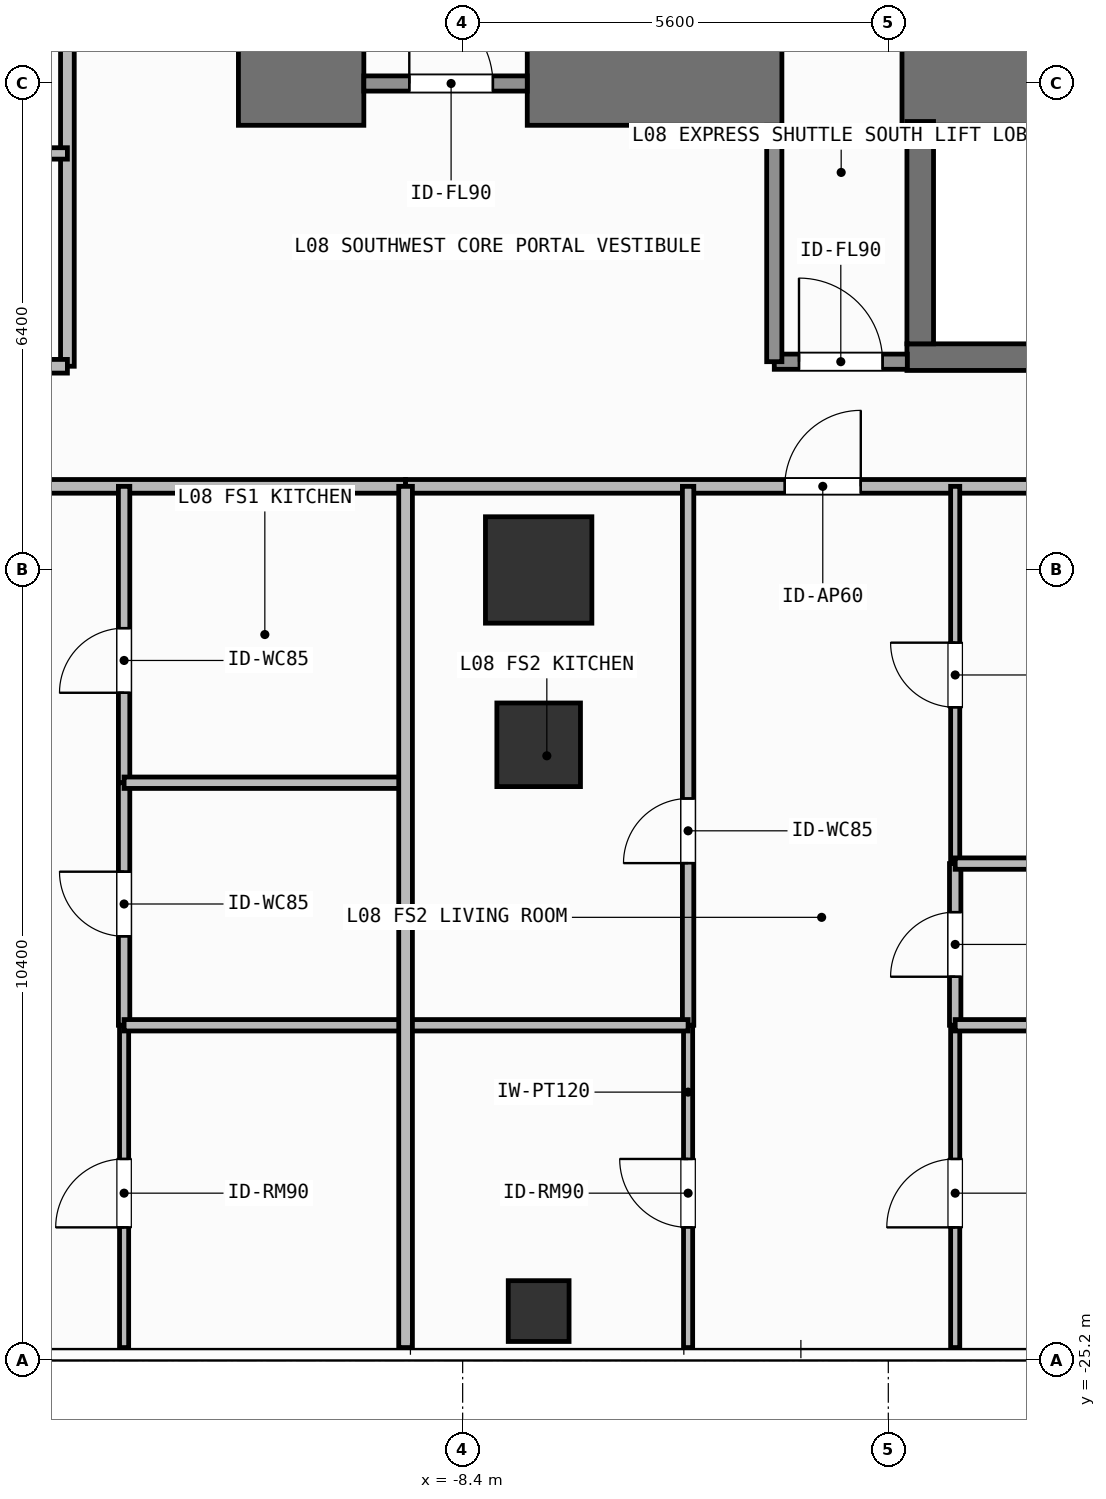
"""IFC4 building model, lengths in metres.
Left out: names, types, materials, properties, quantities, classifications, styles, units other than length and angle.
Written with IfcOpenShell. Run it as: python <this file> out.ifc"""

import sys

from ifc_helpers import new_model, si_unit, direction, frame, frame_2d, origin, origin_2d, place, context, subcontext, project, spatial, rectangle, hollow_rectangle, extrude, element, fill, save


model = new_model("IFC4")
c1 = context("Model", 3, precision=1e-05, world=origin(), true_north=direction((0.0, 1.0)))
c2 = subcontext(c1, "Body", "Model", "MODEL_VIEW")
j1 = project(units=[si_unit("LENGTHUNIT", "METRE"), si_unit("PLANEANGLEUNIT", "RADIAN")], contexts=[c1])
p1 = place(None, origin())
s1 = spatial("IfcSite", under=j1, at=p1, CompositionType="ELEMENT")
p2 = place(p1, origin())
s2 = spatial("IfcBuilding", under=s1, at=p2, CompositionType="ELEMENT")
p3 = place(p2, frame((0.0, 0.0, 30.6)))
s3 = spatial("IfcBuildingStorey", under=s2, at=p3, CompositionType="ELEMENT", Elevation=30.6)
p4 = place(p3, frame((-11.35, -8.4, 0.0), z_axis=(0.0, 0.0, 1.0), x_axis=(1.0, 0.0, 0.0)))
e1 = element("IfcWall", 1, at=p4, inside=s3, PredefinedType="SHEAR", context=c2, shape_type="SweptSolid", body=[
    extrude(rectangle(XDim=1.65, YDim=1.1, at=frame_2d((0.825, 0.0))), origin(), (0.0, 0.0, 1.0), 3.9),
])
p5 = place(p3, frame((-7.55, -8.4, 0.0), z_axis=(0.0, 0.0, 1.0), x_axis=(1.0, 0.0, 0.0)))
e2 = element("IfcWall", 2, at=p5, inside=s3, PredefinedType="SHEAR", context=c2, shape_type="SweptSolid", body=[
    extrude(rectangle(XDim=3.35, YDim=1.1, at=frame_2d((1.675, 0.0))), origin(), (0.0, 0.0, 1.0), 3.9),
])
p6 = place(p3, frame((-2.62, -8.4, 0.0), z_axis=(0.0, 0.0, 1.0), x_axis=(1.0, 0.0, 0.0)))
e3 = element("IfcWall", 3, at=p6, inside=s3, PredefinedType="SHEAR", context=c2, shape_type="SweptSolid", body=[
    extrude(rectangle(XDim=7.27, YDim=1.1, at=frame_2d((3.635, 0.0))), origin(), (0.0, 0.0, 1.0), 3.9),
])
p7 = place(p3, frame((-2.555, -12.0, 0.0), z_axis=(0.0, 0.0, 1.0), x_axis=(1.0, 0.0, 0.0)))
e4 = element("IfcWall", 4, at=p7, inside=s3, PredefinedType="SHEAR", context=c2, shape_type="SweptSolid", body=[
    extrude(rectangle(XDim=7.31, YDim=0.35, at=frame_2d((3.655, 0.0))), origin(), (0.0, 0.0, 1.0), 3.9),
])
p8 = place(p3, frame((-2.2, -8.988, 0.0), z_axis=(0.0, 0.0, 1.0), x_axis=(1.0, 0.0, 0.0)))
e5 = element("IfcWall", 5, at=p8, inside=s3, PredefinedType="SHEAR", context=c2, shape_type="SweptSolid", body=[
    extrude(rectangle(XDim=6.6, YDim=0.075, at=frame_2d((3.3, 0.0))), origin(), (0.0, 0.0, 1.0), 3.9),
])
p9 = place(p3, frame((-2.38, -11.825, 0.0), z_axis=(0.0, 0.0, 1.0), x_axis=(0.0, 1.0, 0.0)))
e6 = element("IfcWall", 6, at=p9, inside=s3, PredefinedType="SHEAR", context=c2, shape_type="SweptSolid", body=[
    extrude(rectangle(XDim=2.925, YDim=0.35, at=frame_2d((1.462, 0.0))), origin(), (0.0, 0.0, 1.0), 3.9),
])
p10 = place(p3, frame((-7.4, -14.8, 0.0), z_axis=(0.0, 0.0, 1.0), x_axis=(1.0, 0.0, 0.0)))
e7 = element("IfcColumn", 7, at=p10, inside=s3, PredefinedType="COLUMN", context=c2, shape_type="SweptSolid", body=[
    extrude(rectangle(XDim=1.4, YDim=1.4, at=origin_2d()), origin(), (0.0, 0.0, 1.0), 3.9),
])
p11 = place(p3, frame((-7.4, -17.1, 0.0), z_axis=(0.0, 0.0, 1.0), x_axis=(1.0, 0.0, 0.0)))
e8 = element("IfcColumn", 8, at=p11, inside=s3, PredefinedType="COLUMN", context=c2, shape_type="SweptSolid", body=[
    extrude(rectangle(XDim=1.1, YDim=1.1, at=origin_2d()), origin(), (0.0, 0.0, 1.0), 3.9),
])
p12 = place(p3, frame((-7.4, -24.55, 0.0), z_axis=(0.0, 0.0, 1.0), x_axis=(1.0, 0.0, 0.0)))
e9 = element("IfcColumn", 9, at=p12, inside=s3, PredefinedType="COLUMN", context=c2, shape_type="SweptSolid", body=[
    extrude(hollow_rectangle(XDim=0.8, YDim=0.8, WallThickness=0.036, at=origin_2d()), origin(), (0.0, 0.0, 1.0), 3.9),
])
p13 = place(p3, frame((-9.7, -8.4, 0.0), z_axis=(0.0, 0.0, 1.0), x_axis=(1.0, 0.0, 0.0)))
e10 = element("IfcWall", 10, at=p13, inside=s3, PredefinedType="SOLIDWALL", context=c2, shape_type="SweptSolid", body=[
    extrude(rectangle(XDim=2.15, YDim=0.2, at=frame_2d((1.075, 0.0))), origin(), (0.0, 0.0, 1.0), 2.72),
])
p14 = place(p13, frame((0.598, 0.0, 0.0)))
e11 = element("IfcOpeningElement", 11, at=p14, cuts=e10, PredefinedType="OPENING", context=c2, shape_type="SweptSolid", body=[
    extrude(rectangle(XDim=1.1, YDim=2.15, at=frame_2d((0.55, 1.075))), frame((0.0, 0.11, 0.0), z_axis=(0.0, -1.0, 0.0), x_axis=(1.0, 0.0, 0.0)), (0.0, 0.0, 1.0), 0.22),
])
p15 = place(p3, frame((-4.3, -12.06, 0.0), z_axis=(0.0, 0.0, 1.0), x_axis=(1.0, 0.0, 0.0)))
e12 = element("IfcWall", 12, at=p15, inside=s3, PredefinedType="SOLIDWALL", context=c2, shape_type="SweptSolid", body=[
    extrude(rectangle(XDim=1.75, YDim=0.2, at=frame_2d((0.875, 0.0))), origin(), (0.0, 0.0, 1.0), 3.68),
])
p16 = place(p15, frame((0.325, 0.0, 0.0)))
e13 = element("IfcOpeningElement", 13, at=p16, cuts=e12, PredefinedType="OPENING", context=c2, shape_type="SweptSolid", body=[
    extrude(rectangle(XDim=1.1, YDim=2.15, at=frame_2d((0.55, 1.075))), frame((0.0, 0.11, 0.0), z_axis=(0.0, -1.0, 0.0), x_axis=(1.0, 0.0, 0.0)), (0.0, 0.0, 1.0), 0.22),
])
p17 = place(p3, frame((-18.62, -13.7, 0.0), z_axis=(0.0, 0.0, 1.0), x_axis=(1.0, 0.0, 0.0)))
e14 = element("IfcWall", 14, at=p17, inside=s3, PredefinedType="PARTITIONING", context=c2, shape_type="SweptSolid", body=[
    extrude(rectangle(XDim=9.469, YDim=0.18, at=frame_2d((4.735, 0.0))), origin(), (0.0, 0.0, 1.0), 3.68),
])
p18 = place(p17, frame((1.931, 0.0, 0.0)))
e15 = element("IfcOpeningElement", 15, at=p18, cuts=e14, PredefinedType="OPENING", context=c2, shape_type="SweptSolid", body=[
    extrude(rectangle(XDim=1.0, YDim=2.2, at=frame_2d((0.5, 1.1))), frame((0.0, 0.1, 0.0), z_axis=(0.0, -1.0, 0.0), x_axis=(1.0, 0.0, 0.0)), (0.0, 0.0, 1.0), 0.2),
])
p19 = place(p3, frame((-12.854, -17.599, 0.0), z_axis=(0.0, 0.0, 1.0), x_axis=(0.0, 1.0, 0.0)))
e16 = element("IfcWall", 16, at=p19, inside=s3, PredefinedType="PARTITIONING", context=c2, shape_type="SweptSolid", body=[
    extrude(rectangle(XDim=3.899, YDim=0.15, at=frame_2d((1.95, 0.0))), origin(), (0.0, 0.0, 1.0), 3.68),
])
p20 = place(p19, frame((1.183, 0.0, 0.0)))
e17 = element("IfcOpeningElement", 17, at=p20, cuts=e16, PredefinedType="OPENING", context=c2, shape_type="SweptSolid", body=[
    extrude(rectangle(XDim=0.85, YDim=2.1, at=frame_2d((0.425, 1.05))), frame((0.0, 0.085, 0.0), z_axis=(0.0, -1.0, 0.0), x_axis=(1.0, 0.0, 0.0)), (0.0, 0.0, 1.0), 0.17),
])
p21 = place(p3, frame((-12.854, -20.79, 0.0), z_axis=(0.0, 0.0, 1.0), x_axis=(0.0, 1.0, 0.0)))
e18 = element("IfcWall", 18, at=p21, inside=s3, PredefinedType="PARTITIONING", context=c2, shape_type="SweptSolid", body=[
    extrude(rectangle(XDim=3.191, YDim=0.15, at=frame_2d((1.595, 0.0))), origin(), (0.0, 0.0, 1.0), 3.68),
])
p22 = place(p21, frame((1.17, 0.0, 0.0)))
e19 = element("IfcOpeningElement", 19, at=p22, cuts=e18, PredefinedType="OPENING", context=c2, shape_type="SweptSolid", body=[
    extrude(rectangle(XDim=0.85, YDim=2.1, at=frame_2d((0.425, 1.05))), frame((0.0, 0.085, 0.0), z_axis=(0.0, -1.0, 0.0), x_axis=(1.0, 0.0, 0.0)), (0.0, 0.0, 1.0), 0.17),
])
p23 = place(p3, frame((-12.854, -25.03, 0.0), z_axis=(0.0, 0.0, 1.0), x_axis=(0.0, 1.0, 0.0)))
e20 = element("IfcWall", 20, at=p23, inside=s3, PredefinedType="PARTITIONING", context=c2, shape_type="SweptSolid", body=[
    extrude(rectangle(XDim=4.24, YDim=0.12, at=frame_2d((2.12, 0.0))), origin(), (0.0, 0.0, 1.0), 3.68),
])
p24 = place(p23, frame((1.581, 0.0, 0.0)))
e21 = element("IfcOpeningElement", 21, at=p24, cuts=e20, PredefinedType="OPENING", context=c2, shape_type="SweptSolid", body=[
    extrude(rectangle(XDim=0.9, YDim=2.1, at=frame_2d((0.45, 1.05))), frame((0.0, 0.07, 0.0), z_axis=(0.0, -1.0, 0.0), x_axis=(1.0, 0.0, 0.0)), (0.0, 0.0, 1.0), 0.14),
])
p25 = place(p3, frame((-9.151, -13.7, 0.0), z_axis=(0.0, 0.0, 1.0), x_axis=(1.0, 0.0, 0.0)))
e22 = element("IfcWall", 22, at=p25, inside=s3, PredefinedType="PARTITIONING", context=c2, shape_type="SweptSolid", body=[
    extrude(rectangle(XDim=12.051, YDim=0.18, at=frame_2d((6.025, 0.0))), origin(), (0.0, 0.0, 1.0), 3.68),
])
p26 = place(p25, frame((4.989, 0.0, 0.0)))
e23 = element("IfcOpeningElement", 23, at=p26, cuts=e22, PredefinedType="OPENING", context=c2, shape_type="SweptSolid", body=[
    extrude(rectangle(XDim=1.0, YDim=2.2, at=frame_2d((0.5, 1.1))), frame((0.0, 0.1, 0.0), z_axis=(0.0, -1.0, 0.0), x_axis=(1.0, 0.0, 0.0)), (0.0, 0.0, 1.0), 0.2),
])
p27 = place(p3, frame((-5.434, -20.79, 0.0), z_axis=(0.0, 0.0, 1.0), x_axis=(0.0, 1.0, 0.0)))
e24 = element("IfcWall", 24, at=p27, inside=s3, PredefinedType="PARTITIONING", context=c2, shape_type="SweptSolid", body=[
    extrude(rectangle(XDim=7.09, YDim=0.15, at=frame_2d((3.545, 0.0))), origin(), (0.0, 0.0, 1.0), 3.68),
])
p28 = place(p27, frame((2.133, 0.0, 0.0)))
e25 = element("IfcOpeningElement", 25, at=p28, cuts=e24, PredefinedType="OPENING", context=c2, shape_type="SweptSolid", body=[
    extrude(rectangle(XDim=0.85, YDim=2.1, at=frame_2d((0.425, 1.05))), frame((0.0, 0.085, 0.0), z_axis=(0.0, -1.0, 0.0), x_axis=(1.0, 0.0, 0.0)), (0.0, 0.0, 1.0), 0.17),
])
p29 = place(p3, frame((-5.434, -25.03, 0.0), z_axis=(0.0, 0.0, 1.0), x_axis=(0.0, 1.0, 0.0)))
e26 = element("IfcWall", 26, at=p29, inside=s3, PredefinedType="PARTITIONING", context=c2, shape_type="SweptSolid", body=[
    extrude(rectangle(XDim=4.24, YDim=0.12, at=frame_2d((2.12, 0.0))), origin(), (0.0, 0.0, 1.0), 3.68),
])
p30 = place(p29, frame((1.581, 0.0, 0.0)))
e27 = element("IfcOpeningElement", 27, at=p30, cuts=e26, PredefinedType="OPENING", context=c2, shape_type="SweptSolid", body=[
    extrude(rectangle(XDim=0.9, YDim=2.1, at=frame_2d((0.45, 1.05))), frame((0.0, 0.07, 0.0), z_axis=(0.0, -1.0, 0.0), x_axis=(1.0, 0.0, 0.0)), (0.0, 0.0, 1.0), 0.14),
])
p31 = place(p3, frame((-1.92, -20.79, 0.0), z_axis=(0.0, 0.0, 1.0), x_axis=(0.0, 1.0, 0.0)))
e28 = element("IfcWall", 28, at=p31, inside=s3, PredefinedType="PARTITIONING", context=c2, shape_type="SweptSolid", body=[
    extrude(rectangle(XDim=2.127, YDim=0.15, at=frame_2d((1.063, 0.0))), origin(), (0.0, 0.0, 1.0), 3.68),
])
p32 = place(p31, frame((0.638, 0.0, 0.0)))
e29 = element("IfcOpeningElement", 29, at=p32, cuts=e28, PredefinedType="OPENING", context=c2, shape_type="SweptSolid", body=[
    extrude(rectangle(XDim=0.85, YDim=2.1, at=frame_2d((0.425, 1.05))), frame((0.0, 0.085, 0.0), z_axis=(0.0, -1.0, 0.0), x_axis=(1.0, 0.0, 0.0)), (0.0, 0.0, 1.0), 0.17),
])
p33 = place(p3, frame((-1.92, -18.663, 0.0), z_axis=(0.0, 0.0, 1.0), x_axis=(0.0, 1.0, 0.0)))
e30 = element("IfcWall", 30, at=p33, inside=s3, PredefinedType="PARTITIONING", context=c2, shape_type="SweptSolid", body=[
    extrude(rectangle(XDim=4.963, YDim=0.12, at=frame_2d((2.481, 0.0))), origin(), (0.0, 0.0, 1.0), 3.68),
])
p34 = place(p33, frame((2.056, 0.0, 0.0)))
e31 = element("IfcOpeningElement", 31, at=p34, cuts=e30, PredefinedType="OPENING", context=c2, shape_type="SweptSolid", body=[
    extrude(rectangle(XDim=0.85, YDim=2.1, at=frame_2d((0.425, 1.05))), frame((0.0, 0.07, 0.0), z_axis=(0.0, -1.0, 0.0), x_axis=(1.0, 0.0, 0.0)), (0.0, 0.0, 1.0), 0.14),
])
p35 = place(p3, frame((-1.92, -25.03, 0.0), z_axis=(0.0, 0.0, 1.0), x_axis=(0.0, 1.0, 0.0)))
e32 = element("IfcWall", 32, at=p35, inside=s3, PredefinedType="PARTITIONING", context=c2, shape_type="SweptSolid", body=[
    extrude(rectangle(XDim=4.24, YDim=0.12, at=frame_2d((2.12, 0.0))), origin(), (0.0, 0.0, 1.0), 3.68),
])
p36 = place(p35, frame((1.581, 0.0, 0.0)))
e33 = element("IfcOpeningElement", 33, at=p36, cuts=e32, PredefinedType="OPENING", context=c2, shape_type="SweptSolid", body=[
    extrude(rectangle(XDim=0.9, YDim=2.1, at=frame_2d((0.45, 1.05))), frame((0.0, 0.07, 0.0), z_axis=(0.0, -1.0, 0.0), x_axis=(1.0, 0.0, 0.0)), (0.0, 0.0, 1.0), 0.14),
])
p37 = place(p3, frame((-13.6, -12.12, 0.0), z_axis=(0.0, 0.0, 1.0), x_axis=(0.0, 1.0, 0.0)))
e34 = element("IfcWall", 34, at=p37, inside=s3, PredefinedType="PARTITIONING", context=c2, shape_type="SweptSolid", body=[
    extrude(rectangle(XDim=12.847, YDim=0.18, at=frame_2d((6.424, 0.0))), origin(), (0.0, 0.0, 1.0), 3.68),
])
p38 = place(p37, frame((5.48, 0.0, 0.0)))
e35 = element("IfcOpeningElement", 35, at=p38, cuts=e34, PredefinedType="OPENING", context=c2, shape_type="SweptSolid", body=[
    extrude(rectangle(XDim=1.0, YDim=2.2, at=frame_2d((0.5, 1.1))), frame((0.0, 0.1, 0.0), z_axis=(0.0, -1.0, 0.0), x_axis=(1.0, 0.0, 0.0)), (0.0, 0.0, 1.0), 0.2),
])
p39 = place(p3, frame((-16.808, -9.32, 0.0), z_axis=(0.0, 0.0, 1.0), x_axis=(1.0, 0.0, 0.0)))
e36 = element("IfcWall", 36, at=p39, inside=s3, PredefinedType="PARTITIONING", context=c2, shape_type="SweptSolid", body=[
    extrude(rectangle(XDim=3.208, YDim=0.15, at=frame_2d((1.604, 0.0))), origin(), (0.0, 0.0, 1.0), 3.68),
])
p40 = place(p39, frame((0.33, 0.0, 0.0)))
e37 = element("IfcOpeningElement", 37, at=p40, cuts=e36, PredefinedType="OPENING", context=c2, shape_type="SweptSolid", body=[
    extrude(rectangle(XDim=0.85, YDim=2.1, at=frame_2d((0.425, 1.05))), frame((0.0, 0.085, 0.0), z_axis=(0.0, -1.0, 0.0), x_axis=(1.0, 0.0, 0.0)), (0.0, 0.0, 1.0), 0.17),
])
p41 = place(p3, frame((-4.3, -12.06, 0.0), z_axis=(0.0, 0.0, 1.0), x_axis=(0.0, 1.0, 0.0)))
e38 = element("IfcWall", 38, at=p41, inside=s3, PredefinedType="SOLIDWALL", context=c2, shape_type="SweptSolid", body=[
    extrude(rectangle(XDim=3.11, YDim=0.2, at=frame_2d((1.555, 0.0))), origin(), (0.0, 0.0, 1.0), 3.68),
])
for number, where, z_axis, x_axis in (
    (39, (-12.854, -17.599, 0.0), (0.0, 0.0, 1.0), (1.0, 0.0, 0.0)),
    (40, (-12.854, -20.79, 0.0), (0.0, 0.0, 1.0), (1.0, 0.0, 0.0)),
):
    element("IfcWall", number, at=place(p3, frame(where, z_axis=z_axis, x_axis=x_axis)), inside=s3, PredefinedType="PARTITIONING", context=c2, shape_type="SweptSolid", body=[
        extrude(rectangle(XDim=3.703, YDim=0.15, at=frame_2d((1.852, 0.0))), origin(), (0.0, 0.0, 1.0), 3.68),
    ])
p42 = place(p3, frame((-9.151, -20.79, 0.0), z_axis=(0.0, 0.0, 1.0), x_axis=(1.0, 0.0, 0.0)))
e41 = element("IfcWall", 41, at=p42, inside=s3, PredefinedType="PARTITIONING", context=c2, shape_type="SweptSolid", body=[
    extrude(rectangle(XDim=3.717, YDim=0.15, at=frame_2d((1.858, 0.0))), origin(), (0.0, 0.0, 1.0), 3.68),
])
for number, where, z_axis, x_axis in (
    (42, (-1.92, -18.663, 0.0), (0.0, 0.0, 1.0), (1.0, 0.0, 0.0)),
    (43, (-1.92, -20.79, 0.0), (0.0, 0.0, 1.0), (1.0, 0.0, 0.0)),
):
    element("IfcWall", number, at=place(p3, frame(where, z_axis=z_axis, x_axis=x_axis)), inside=s3, PredefinedType="PARTITIONING", context=c2, shape_type="SweptSolid", body=[
        extrude(rectangle(XDim=4.82, YDim=0.15, at=frame_2d((2.41, 0.0))), origin(), (0.0, 0.0, 1.0), 3.68),
    ])
p43 = place(p3, frame((-9.151, -25.03, 0.0), z_axis=(0.0, 0.0, 1.0), x_axis=(0.0, 1.0, 0.0)))
e44 = element("IfcWall", 44, at=p43, inside=s3, PredefinedType="PARTITIONING", context=c2, shape_type="SweptSolid", body=[
    extrude(rectangle(XDim=11.33, YDim=0.18, at=frame_2d((5.665, 0.0))), origin(), (0.0, 0.0, 1.0), 3.68),
])
p44 = place(p3, frame((-22.13, -12.12, 0.0), z_axis=(0.0, 0.0, 1.0), x_axis=(1.0, 0.0, 0.0)))
e45 = element("IfcWall", 45, at=p44, inside=s3, PredefinedType="PARTITIONING", context=c2, shape_type="SweptSolid", body=[
    extrude(rectangle(XDim=8.53, YDim=0.18, at=frame_2d((4.265, 0.0))), origin(), (0.0, 0.0, 1.0), 3.68),
])
p45 = place(p14, origin())
e46 = element("IfcDoor", 46, at=p45, inside=s3, OperationType="SINGLE_SWING_LEFT", PredefinedType="DOOR", context=c2, shape_type="SweptSolid", body=[
    extrude(rectangle(XDim=1.1, YDim=2.15, at=frame_2d((0.55, 1.075))), frame((0.0, 0.025, 0.0), z_axis=(0.0, -1.0, 0.0), x_axis=(1.0, 0.0, 0.0)), (0.0, 0.0, 1.0), 0.05),
])
fill(e11, e46)
p46 = place(p16, origin())
e47 = element("IfcDoor", 47, at=p46, inside=s3, OperationType="SINGLE_SWING_LEFT", PredefinedType="DOOR", context=c2, shape_type="SweptSolid", body=[
    extrude(rectangle(XDim=1.1, YDim=2.15, at=frame_2d((0.55, 1.075))), frame((0.0, 0.025, 0.0), z_axis=(0.0, -1.0, 0.0), x_axis=(1.0, 0.0, 0.0)), (0.0, 0.0, 1.0), 0.05),
])
fill(e13, e47)
p47 = place(p20, origin())
e48 = element("IfcDoor", 48, at=p47, inside=s3, OperationType="SINGLE_SWING_LEFT", PredefinedType="DOOR", context=c2, shape_type="SweptSolid", body=[
    extrude(rectangle(XDim=0.85, YDim=2.1, at=frame_2d((0.425, 1.05))), frame((0.0, 0.025, 0.0), z_axis=(0.0, -1.0, 0.0), x_axis=(1.0, 0.0, 0.0)), (0.0, 0.0, 1.0), 0.05),
])
fill(e17, e48)
p48 = place(p22, origin())
e49 = element("IfcDoor", 49, at=p48, inside=s3, OperationType="SINGLE_SWING_RIGHT", PredefinedType="DOOR", context=c2, shape_type="SweptSolid", body=[
    extrude(rectangle(XDim=0.85, YDim=2.1, at=frame_2d((0.425, 1.05))), frame((0.0, 0.025, 0.0), z_axis=(0.0, -1.0, 0.0), x_axis=(1.0, 0.0, 0.0)), (0.0, 0.0, 1.0), 0.05),
])
fill(e19, e49)
p49 = place(p24, origin())
e50 = element("IfcDoor", 50, at=p49, inside=s3, OperationType="SINGLE_SWING_LEFT", PredefinedType="DOOR", context=c2, shape_type="SweptSolid", body=[
    extrude(rectangle(XDim=0.9, YDim=2.1, at=frame_2d((0.45, 1.05))), frame((0.0, 0.025, 0.0), z_axis=(0.0, -1.0, 0.0), x_axis=(1.0, 0.0, 0.0)), (0.0, 0.0, 1.0), 0.05),
])
fill(e21, e50)
p50 = place(p26, origin())
e51 = element("IfcDoor", 51, at=p50, inside=s3, OperationType="SINGLE_SWING_RIGHT", PredefinedType="DOOR", context=c2, shape_type="SweptSolid", body=[
    extrude(rectangle(XDim=1.0, YDim=2.2, at=frame_2d((0.5, 1.1))), frame((0.0, 0.025, 0.0), z_axis=(0.0, -1.0, 0.0), x_axis=(1.0, 0.0, 0.0)), (0.0, 0.0, 1.0), 0.05),
])
fill(e23, e51)
p51 = place(p28, origin())
e52 = element("IfcDoor", 52, at=p51, inside=s3, OperationType="SINGLE_SWING_LEFT", PredefinedType="DOOR", context=c2, shape_type="SweptSolid", body=[
    extrude(rectangle(XDim=0.85, YDim=2.1, at=frame_2d((0.425, 1.05))), frame((0.0, 0.025, 0.0), z_axis=(0.0, -1.0, 0.0), x_axis=(1.0, 0.0, 0.0)), (0.0, 0.0, 1.0), 0.05),
])
fill(e25, e52)
p52 = place(p30, origin())
e53 = element("IfcDoor", 53, at=p52, inside=s3, OperationType="SINGLE_SWING_RIGHT", PredefinedType="DOOR", context=c2, shape_type="SweptSolid", body=[
    extrude(rectangle(XDim=0.9, YDim=2.1, at=frame_2d((0.45, 1.05))), frame((0.0, 0.025, 0.0), z_axis=(0.0, -1.0, 0.0), x_axis=(1.0, 0.0, 0.0)), (0.0, 0.0, 1.0), 0.05),
])
fill(e27, e53)
p53 = place(p32, origin())
e54 = element("IfcDoor", 54, at=p53, inside=s3, OperationType="SINGLE_SWING_LEFT", PredefinedType="DOOR", context=c2, shape_type="SweptSolid", body=[
    extrude(rectangle(XDim=0.85, YDim=2.1, at=frame_2d((0.425, 1.05))), frame((0.0, 0.025, 0.0), z_axis=(0.0, -1.0, 0.0), x_axis=(1.0, 0.0, 0.0)), (0.0, 0.0, 1.0), 0.05),
])
fill(e29, e54)
p54 = place(p34, origin())
e55 = element("IfcDoor", 55, at=p54, inside=s3, OperationType="SINGLE_SWING_RIGHT", PredefinedType="DOOR", context=c2, shape_type="SweptSolid", body=[
    extrude(rectangle(XDim=0.85, YDim=2.1, at=frame_2d((0.425, 1.05))), frame((0.0, 0.025, 0.0), z_axis=(0.0, -1.0, 0.0), x_axis=(1.0, 0.0, 0.0)), (0.0, 0.0, 1.0), 0.05),
])
fill(e31, e55)
p55 = place(p36, origin())
e56 = element("IfcDoor", 56, at=p55, inside=s3, OperationType="SINGLE_SWING_LEFT", PredefinedType="DOOR", context=c2, shape_type="SweptSolid", body=[
    extrude(rectangle(XDim=0.9, YDim=2.1, at=frame_2d((0.45, 1.05))), frame((0.0, 0.025, 0.0), z_axis=(0.0, -1.0, 0.0), x_axis=(1.0, 0.0, 0.0)), (0.0, 0.0, 1.0), 0.05),
])
fill(e33, e56)
save(model, sys.argv[1])
